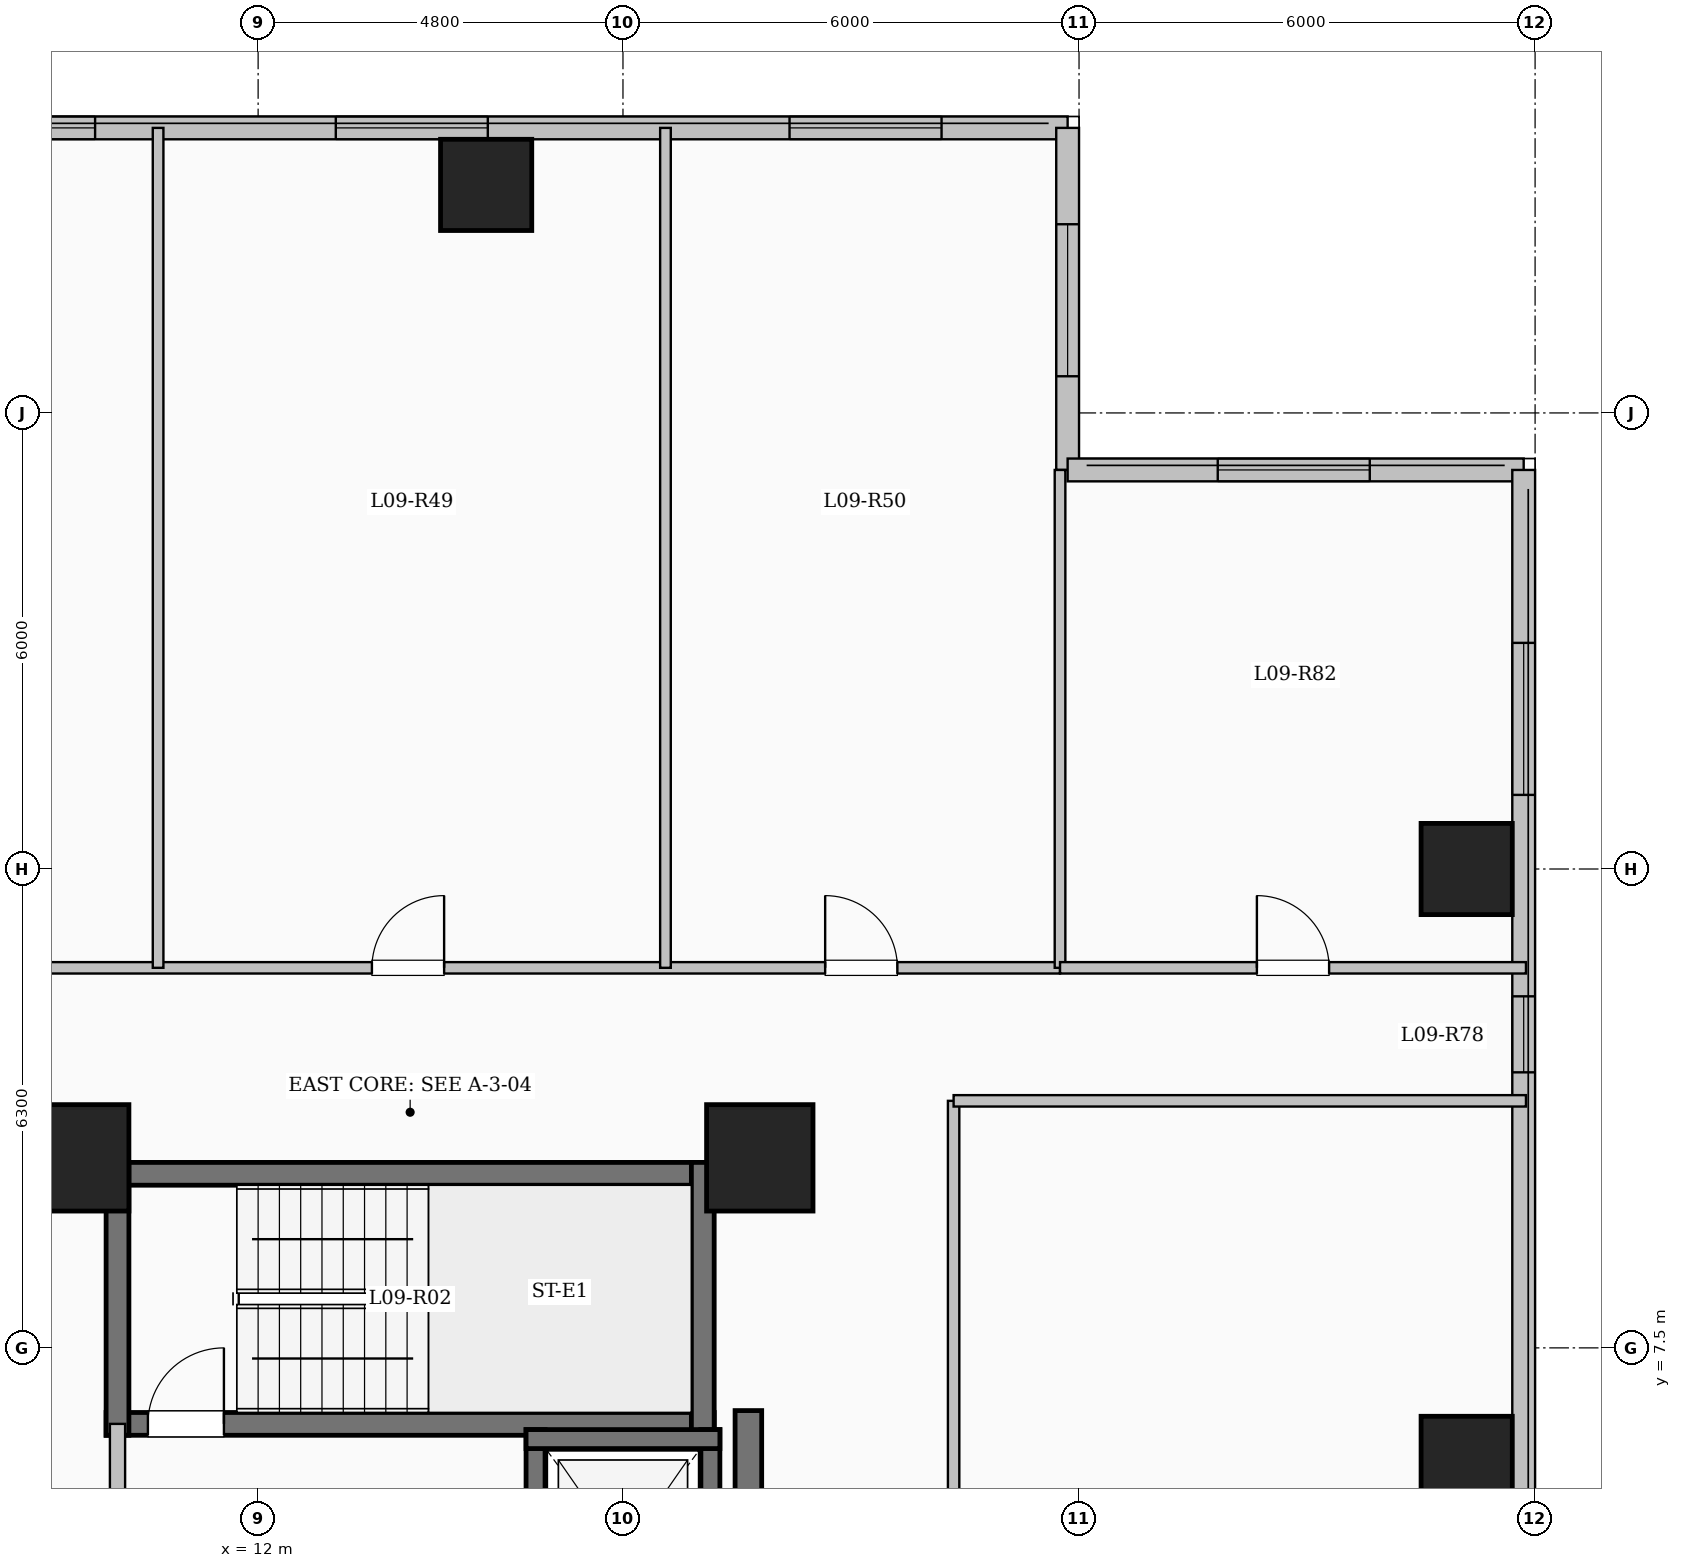
"""IFC4 building model, lengths in metres.
Left out: names, types, materials, properties, quantities, classifications, styles, units other than length and angle.
Written with IfcOpenShell. Run it as: python <this file> out.ifc"""

import sys

from ifc_helpers import new_model, si_unit, direction, frame, frame_2d, origin, origin_2d, place, context, subcontext, project, spatial, rectangle, extrude, element, fill, save


model = new_model("IFC4")
c1 = context("Model", 3, precision=1e-05, world=origin(), true_north=direction((0.0, 1.0)))
c2 = subcontext(c1, "Body", "Model", "MODEL_VIEW")
j1 = project(units=[si_unit("LENGTHUNIT", "METRE"), si_unit("PLANEANGLEUNIT", "RADIAN")], contexts=[c1])
p1 = place(None, origin())
s1 = spatial("IfcSite", under=j1, at=p1, CompositionType="ELEMENT")
p2 = place(p1, origin())
s2 = spatial("IfcBuilding", under=s1, at=p2, CompositionType="ELEMENT")
p3 = place(p2, frame((0.0, 0.0, 37.4)))
s3 = spatial("IfcBuildingStorey", under=s2, at=p3, CompositionType="ELEMENT", Elevation=37.4)
for number, where, z_axis, x_axis in (
    (1, (9.6, 10.0, 0.0), (0.0, 0.0, 1.0), (1.0, 0.0, 0.0)),
    (2, (18.6, 10.0, 0.0), (0.0, 0.0, 1.0), (1.0, 0.0, 0.0)),
):
    element("IfcColumn", number, at=place(p3, frame(where, z_axis=z_axis, x_axis=x_axis)), inside=s3, PredefinedType="COLUMN", context=c2, shape_type="SweptSolid", body=[
        extrude(rectangle(XDim=1.4, YDim=1.4, at=origin_2d()), origin(), (0.0, 0.0, 1.0), 3.35),
    ])
for number, where, z_axis, x_axis in (
    (3, (15.0, 22.8, 0.0), (0.0, 0.0, 1.0), (1.0, 0.0, 0.0)),
    (4, (27.9, 6.0, 0.0), (0.0, 0.0, 1.0), (1.0, 0.0, 0.0)),
    (5, (27.9, 13.8, 0.0), (0.0, 0.0, 1.0), (1.0, 0.0, 0.0)),
):
    element("IfcColumn", number, at=place(p3, frame(where, z_axis=z_axis, x_axis=x_axis)), inside=s3, PredefinedType="COLUMN", context=c2, shape_type="SweptSolid", body=[
        extrude(rectangle(XDim=1.2, YDim=1.2, at=origin_2d()), origin(), (0.0, 0.0, 1.0), 3.35),
    ])
p4 = place(p3, frame((7.35, 23.55, 0.0), z_axis=(0.0, 0.0, 1.0), x_axis=(1.0, 0.0, 0.0)))
e6 = element("IfcWall", 6, at=p4, inside=s3, PredefinedType="SOLIDWALL", context=c2, shape_type="SweptSolid", body=[
    extrude(rectangle(XDim=15.3, YDim=0.3, at=frame_2d((7.65, 0.0))), origin(), (0.0, 0.0, 1.0), 3.1),
])
p5 = place(p4, frame((0.705, 0.0, 0.9)))
e7 = element("IfcOpeningElement", 7, at=p5, cuts=e6, PredefinedType="OPENING", context=c2, shape_type="SweptSolid", body=[
    extrude(rectangle(XDim=1.8, YDim=1.65, at=frame_2d((0.9, 0.825))), frame((0.0, 0.16, 0.0), z_axis=(0.0, -1.0, 0.0), x_axis=(1.0, 0.0, 0.0)), (0.0, 0.0, 1.0), 0.32),
])
p6 = place(p4, frame((5.672, 0.0, 0.9)))
e8 = element("IfcOpeningElement", 8, at=p6, cuts=e6, PredefinedType="OPENING", context=c2, shape_type="SweptSolid", body=[
    extrude(rectangle(XDim=2.0, YDim=1.7, at=frame_2d((1.0, 0.85))), frame((0.0, 0.16, 0.0), z_axis=(0.0, -1.0, 0.0), x_axis=(1.0, 0.0, 0.0)), (0.0, 0.0, 1.0), 0.32),
])
p7 = place(p4, frame((11.641, 0.0, 0.9)))
e9 = element("IfcOpeningElement", 9, at=p7, cuts=e6, PredefinedType="OPENING", context=c2, shape_type="SweptSolid", body=[
    extrude(rectangle(XDim=2.0, YDim=1.7, at=frame_2d((1.0, 0.85))), frame((0.0, 0.16, 0.0), z_axis=(0.0, -1.0, 0.0), x_axis=(1.0, 0.0, 0.0)), (0.0, 0.0, 1.0), 0.32),
])
p8 = place(p3, frame((22.65, 23.55, 0.0), z_axis=(0.0, 0.0, 1.0), x_axis=(0.0, -1.0, 0.0)))
e10 = element("IfcWall", 10, at=p8, inside=s3, PredefinedType="SOLIDWALL", context=c2, shape_type="SweptSolid", body=[
    extrude(rectangle(XDim=4.5, YDim=0.3, at=frame_2d((2.25, 0.0))), origin(), (0.0, 0.0, 1.0), 3.1),
])
p9 = place(p8, frame((1.268, 0.0, 0.9)))
e11 = element("IfcOpeningElement", 11, at=p9, cuts=e10, PredefinedType="OPENING", context=c2, shape_type="SweptSolid", body=[
    extrude(rectangle(XDim=2.0, YDim=1.7, at=frame_2d((1.0, 0.85))), frame((0.0, 0.16, 0.0), z_axis=(0.0, -1.0, 0.0), x_axis=(1.0, 0.0, 0.0)), (0.0, 0.0, 1.0), 0.32),
])
p10 = place(p3, frame((22.65, 19.05, 0.0), z_axis=(0.0, 0.0, 1.0), x_axis=(1.0, 0.0, 0.0)))
e12 = element("IfcWall", 12, at=p10, inside=s3, PredefinedType="SOLIDWALL", context=c2, shape_type="SweptSolid", body=[
    extrude(rectangle(XDim=6.0, YDim=0.3, at=frame_2d((3.0, 0.0))), origin(), (0.0, 0.0, 1.0), 3.1),
])
p11 = place(p10, frame((1.975, 0.0, 0.9)))
e13 = element("IfcOpeningElement", 13, at=p11, cuts=e12, PredefinedType="OPENING", context=c2, shape_type="SweptSolid", body=[
    extrude(rectangle(XDim=2.0, YDim=1.7, at=frame_2d((1.0, 0.85))), frame((0.0, 0.16, 0.0), z_axis=(0.0, -1.0, 0.0), x_axis=(1.0, 0.0, 0.0)), (0.0, 0.0, 1.0), 0.32),
])
p12 = place(p3, frame((28.65, 19.05, 0.0), z_axis=(0.0, 0.0, 1.0), x_axis=(0.0, -1.0, 0.0)))
e14 = element("IfcWall", 14, at=p12, inside=s3, PredefinedType="SOLIDWALL", context=c2, shape_type="SweptSolid", body=[
    extrude(rectangle(XDim=38.1, YDim=0.3, at=frame_2d((19.05, 0.0))), origin(), (0.0, 0.0, 1.0), 3.1),
])
p13 = place(p12, frame((2.275, 0.0, 0.9)))
e15 = element("IfcOpeningElement", 15, at=p13, cuts=e14, PredefinedType="OPENING", context=c2, shape_type="SweptSolid", body=[
    extrude(rectangle(XDim=2.0, YDim=1.7, at=frame_2d((1.0, 0.85))), frame((0.0, 0.16, 0.0), z_axis=(0.0, -1.0, 0.0), x_axis=(1.0, 0.0, 0.0)), (0.0, 0.0, 1.0), 0.32),
])
p14 = place(p12, frame((6.925, 0.0, 0.95)))
e16 = element("IfcOpeningElement", 16, at=p14, cuts=e14, PredefinedType="OPENING", context=c2, shape_type="SweptSolid", body=[
    extrude(rectangle(XDim=1.0, YDim=1.5, at=frame_2d((0.5, 0.75))), frame((0.0, 0.16, 0.0), z_axis=(0.0, -1.0, 0.0), x_axis=(1.0, 0.0, 0.0)), (0.0, 0.0, 1.0), 0.32),
])
p15 = place(p12, frame((16.3, 0.0, 0.9)))
e17 = element("IfcOpeningElement", 17, at=p15, cuts=e14, PredefinedType="OPENING", context=c2, shape_type="SweptSolid", body=[
    extrude(rectangle(XDim=2.0, YDim=1.7, at=frame_2d((1.0, 0.85))), frame((0.0, 0.16, 0.0), z_axis=(0.0, -1.0, 0.0), x_axis=(1.0, 0.0, 0.0)), (0.0, 0.0, 1.0), 0.32),
])
p16 = place(p12, frame((27.058, 0.0, 0.9)))
e18 = element("IfcOpeningElement", 18, at=p16, cuts=e14, PredefinedType="OPENING", context=c2, shape_type="SweptSolid", body=[
    extrude(rectangle(XDim=1.5, YDim=1.65, at=frame_2d((0.75, 0.825))), frame((0.0, 0.16, 0.0), z_axis=(0.0, -1.0, 0.0), x_axis=(1.0, 0.0, 0.0)), (0.0, 0.0, 1.0), 0.32),
])
p17 = place(p12, frame((32.55, 0.0, 0.9)))
e19 = element("IfcOpeningElement", 19, at=p17, cuts=e14, PredefinedType="OPENING", context=c2, shape_type="SweptSolid", body=[
    extrude(rectangle(XDim=2.4, YDim=1.8, at=frame_2d((1.2, 0.9))), frame((0.0, 0.16, 0.0), z_axis=(0.0, -1.0, 0.0), x_axis=(1.0, 0.0, 0.0)), (0.0, 0.0, 1.0), 0.32),
])
p18 = place(p3, frame((10.0, 9.79, 0.0), z_axis=(0.0, 0.0, 1.0), x_axis=(1.0, 0.0, 0.0)))
e20 = element("IfcWall", 20, at=p18, inside=s3, PredefinedType="SHEAR", context=c2, shape_type="SweptSolid", body=[
    extrude(rectangle(XDim=8.0, YDim=0.3, at=frame_2d((4.0, 0.0))), origin(), (0.0, 0.0, 1.0), 3.35),
])
p19 = place(p3, frame((10.0, 6.5, 0.0), z_axis=(0.0, 0.0, 1.0), x_axis=(1.0, 0.0, 0.0)))
e21 = element("IfcWall", 21, at=p19, inside=s3, PredefinedType="SHEAR", context=c2, shape_type="SweptSolid", body=[
    extrude(rectangle(XDim=8.0, YDim=0.3, at=frame_2d((4.0, 0.0))), origin(), (0.0, 0.0, 1.0), 3.35),
])
p20 = place(p19, frame((0.55, 0.0, 0.0)))
e22 = element("IfcOpeningElement", 22, at=p20, cuts=e21, PredefinedType="OPENING", context=c2, shape_type="SweptSolid", body=[
    extrude(rectangle(XDim=1.0, YDim=2.15, at=frame_2d((0.5, 1.075))), frame((0.0, 0.16, 0.0), z_axis=(0.0, -1.0, 0.0), x_axis=(1.0, 0.0, 0.0)), (0.0, 0.0, 1.0), 0.32),
])
for number, where, z_axis, x_axis in (
    (23, (10.15, 6.35, 0.0), (0.0, 0.0, 1.0), (0.0, 1.0, 0.0)),
    (24, (17.85, 6.35, 0.0), (0.0, 0.0, 1.0), (0.0, 1.0, 0.0)),
):
    element("IfcWall", number, at=place(p3, frame(where, z_axis=z_axis, x_axis=x_axis)), inside=s3, PredefinedType="SHEAR", context=c2, shape_type="SweptSolid", body=[
        extrude(rectangle(XDim=3.59, YDim=0.3, at=frame_2d((1.795, 0.0))), origin(), (0.0, 0.0, 1.0), 3.35),
    ])
p21 = place(p3, frame((10.15, 3.25, 0.0), z_axis=(0.0, 0.0, 1.0), x_axis=(0.0, 1.0, 0.0)))
e25 = element("IfcWall", 25, at=p21, inside=s3, PredefinedType="SOLIDWALL", context=c2, shape_type="SweptSolid", body=[
    extrude(rectangle(XDim=3.25, YDim=0.2, at=frame_2d((1.625, 0.0))), origin(), (0.0, 0.0, 1.0), 3.1),
])
p22 = place(p21, frame((1.1, 0.0, 0.0)))
e26 = element("IfcOpeningElement", 26, at=p22, cuts=e25, PredefinedType="OPENING", context=c2, shape_type="SweptSolid", body=[
    extrude(rectangle(XDim=1.02, YDim=2.15, at=frame_2d((0.51, 1.075))), frame((0.0, 0.11, 0.0), z_axis=(0.0, -1.0, 0.0), x_axis=(1.0, 0.0, 0.0)), (0.0, 0.0, 1.0), 0.22),
])
p23 = place(p3, frame((15.65, 3.175, 0.0), z_axis=(0.0, 0.0, 1.0), x_axis=(0.0, 1.0, 0.0)))
e27 = element("IfcWall", 27, at=p23, inside=s3, PredefinedType="SHEAR", context=c2, shape_type="SweptSolid", body=[
    extrude(rectangle(XDim=3.25, YDim=0.25, at=frame_2d((1.625, 0.0))), origin(), (0.0, 0.0, 1.0), 3.35),
])
p24 = place(p23, frame((1.075, 0.0, 0.0)))
e28 = element("IfcOpeningElement", 28, at=p24, cuts=e27, PredefinedType="OPENING", context=c2, shape_type="SweptSolid", body=[
    extrude(rectangle(XDim=1.1, YDim=2.15, at=frame_2d((0.55, 1.075))), frame((0.0, 0.135, 0.0), z_axis=(0.0, -1.0, 0.0), x_axis=(1.0, 0.0, 0.0)), (0.0, 0.0, 1.0), 0.27),
])
p25 = place(p3, frame((17.95, 3.175, 0.0), z_axis=(0.0, 0.0, 1.0), x_axis=(0.0, 1.0, 0.0)))
e29 = element("IfcWall", 29, at=p25, inside=s3, PredefinedType="SHEAR", context=c2, shape_type="SweptSolid", body=[
    extrude(rectangle(XDim=3.25, YDim=0.25, at=frame_2d((1.625, 0.0))), origin(), (0.0, 0.0, 1.0), 3.35),
])
p26 = place(p3, frame((15.525, 6.3, 0.0), z_axis=(0.0, 0.0, 1.0), x_axis=(1.0, 0.0, 0.0)))
e30 = element("IfcWall", 30, at=p26, inside=s3, PredefinedType="SHEAR", context=c2, shape_type="SweptSolid", body=[
    extrude(rectangle(XDim=2.55, YDim=0.25, at=frame_2d((1.275, 0.0))), origin(), (0.0, 0.0, 1.0), 3.35),
])
p27 = place(p3, frame((18.45, -7.375, 0.0), z_axis=(0.0, 0.0, 1.0), x_axis=(0.0, 1.0, 0.0)))
e31 = element("IfcWall", 31, at=p27, inside=s3, PredefinedType="SHEAR", context=c2, shape_type="SweptSolid", body=[
    extrude(rectangle(XDim=14.05, YDim=0.35, at=frame_2d((7.025, 0.0))), origin(), (0.0, 0.0, 1.0), 3.35),
])
p28 = place(p3, frame((3.85, 12.5, 0.0), z_axis=(0.0, 0.0, 1.0), x_axis=(1.0, 0.0, 0.0)))
e32 = element("IfcWall", 32, at=p28, inside=s3, PredefinedType="PARTITIONING", context=c2, shape_type="SweptSolid", body=[
    extrude(rectangle(XDim=18.7, YDim=0.15, at=frame_2d((9.35, 0.0))), origin(), (0.0, 0.0, 1.0), 3.1),
])
p29 = place(p28, frame((2.942, 0.0, 0.0)))
e33 = element("IfcOpeningElement", 33, at=p29, cuts=e32, PredefinedType="OPENING", context=c2, shape_type="SweptSolid", body=[
    extrude(rectangle(XDim=0.95, YDim=2.15, at=frame_2d((0.475, 1.075))), frame((0.0, 0.085, 0.0), z_axis=(0.0, -1.0, 0.0), x_axis=(1.0, 0.0, 0.0)), (0.0, 0.0, 1.0), 0.17),
])
p30 = place(p28, frame((9.647, 0.0, 0.0)))
e34 = element("IfcOpeningElement", 34, at=p30, cuts=e32, PredefinedType="OPENING", context=c2, shape_type="SweptSolid", body=[
    extrude(rectangle(XDim=0.95, YDim=2.15, at=frame_2d((0.475, 1.075))), frame((0.0, 0.085, 0.0), z_axis=(0.0, -1.0, 0.0), x_axis=(1.0, 0.0, 0.0)), (0.0, 0.0, 1.0), 0.17),
])
p31 = place(p28, frame((15.61, 0.0, 0.0)))
e35 = element("IfcOpeningElement", 35, at=p31, cuts=e32, PredefinedType="OPENING", context=c2, shape_type="SweptSolid", body=[
    extrude(rectangle(XDim=0.95, YDim=2.15, at=frame_2d((0.475, 1.075))), frame((0.0, 0.085, 0.0), z_axis=(0.0, -1.0, 0.0), x_axis=(1.0, 0.0, 0.0)), (0.0, 0.0, 1.0), 0.17),
])
p32 = place(p3, frame((21.15, -7.25, 0.0), z_axis=(0.0, 0.0, 1.0), x_axis=(0.0, 1.0, 0.0)))
e36 = element("IfcWall", 36, at=p32, inside=s3, PredefinedType="PARTITIONING", context=c2, shape_type="SweptSolid", body=[
    extrude(rectangle(XDim=18.0, YDim=0.15, at=frame_2d((9.0, 0.0))), origin(), (0.0, 0.0, 1.0), 2.585),
])
for number, where, z_axis, x_axis in (
    (37, (10.684, 12.5, 0.0), (0.0, 0.0, 1.0), (0.0, 1.0, 0.0)),
    (38, (17.359, 12.5, 0.0), (0.0, 0.0, 1.0), (0.0, 1.0, 0.0)),
):
    element("IfcWall", number, at=place(p3, frame(where, z_axis=z_axis, x_axis=x_axis)), inside=s3, PredefinedType="PARTITIONING", context=c2, shape_type="SweptSolid", body=[
        extrude(rectangle(XDim=11.05, YDim=0.14, at=frame_2d((5.525, 0.0))), origin(), (0.0, 0.0, 1.0), 3.1),
    ])
p33 = place(p3, frame((21.15, 10.75, 0.0), z_axis=(0.0, 0.0, 1.0), x_axis=(1.0, 0.0, 0.0)))
e39 = element("IfcWall", 39, at=p33, inside=s3, PredefinedType="PARTITIONING", context=c2, shape_type="SweptSolid", body=[
    extrude(rectangle(XDim=7.53, YDim=0.15, at=frame_2d((3.765, 0.0))), origin(), (0.0, 0.0, 1.0), 3.1),
])
p34 = place(p3, frame((22.55, 12.5, 0.0), z_axis=(0.0, 0.0, 1.0), x_axis=(0.0, 1.0, 0.0)))
e40 = element("IfcWall", 40, at=p34, inside=s3, PredefinedType="PARTITIONING", context=c2, shape_type="SweptSolid", body=[
    extrude(rectangle(XDim=6.55, YDim=0.14, at=frame_2d((3.275, 0.0))), origin(), (0.0, 0.0, 1.0), 3.1),
])
p35 = place(p3, frame((22.55, 12.5, 0.0), z_axis=(0.0, 0.0, 1.0), x_axis=(1.0, 0.0, 0.0)))
e41 = element("IfcWall", 41, at=p35, inside=s3, PredefinedType="PARTITIONING", context=c2, shape_type="SweptSolid", body=[
    extrude(rectangle(XDim=6.13, YDim=0.15, at=frame_2d((3.065, 0.0))), origin(), (0.0, 0.0, 1.0), 3.1),
])
p36 = place(p35, frame((2.59, 0.0, 0.0)))
e42 = element("IfcOpeningElement", 42, at=p36, cuts=e41, PredefinedType="OPENING", context=c2, shape_type="SweptSolid", body=[
    extrude(rectangle(XDim=0.95, YDim=2.15, at=frame_2d((0.475, 1.075))), frame((0.0, 0.085, 0.0), z_axis=(0.0, -1.0, 0.0), x_axis=(1.0, 0.0, 0.0)), (0.0, 0.0, 1.0), 0.17),
])
p37 = place(p5, origin())
e43 = element("IfcWindow", 43, at=p37, inside=s3, PartitioningType="SINGLE_PANEL", PredefinedType="WINDOW", context=c2, shape_type="SweptSolid", body=[
    extrude(rectangle(XDim=1.8, YDim=1.65, at=frame_2d((0.9, 0.825))), frame((0.0, 0.03, 0.0), z_axis=(0.0, -1.0, 0.0), x_axis=(1.0, 0.0, 0.0)), (0.0, 0.0, 1.0), 0.06),
])
fill(e7, e43)
p38 = place(p6, origin())
e44 = element("IfcWindow", 44, at=p38, inside=s3, PartitioningType="SINGLE_PANEL", PredefinedType="WINDOW", context=c2, shape_type="SweptSolid", body=[
    extrude(rectangle(XDim=2.0, YDim=1.7, at=frame_2d((1.0, 0.85))), frame((0.0, 0.03, 0.0), z_axis=(0.0, -1.0, 0.0), x_axis=(1.0, 0.0, 0.0)), (0.0, 0.0, 1.0), 0.06),
])
fill(e8, e44)
p39 = place(p7, origin())
e45 = element("IfcWindow", 45, at=p39, inside=s3, PartitioningType="SINGLE_PANEL", PredefinedType="WINDOW", context=c2, shape_type="SweptSolid", body=[
    extrude(rectangle(XDim=2.0, YDim=1.7, at=frame_2d((1.0, 0.85))), frame((0.0, 0.03, 0.0), z_axis=(0.0, -1.0, 0.0), x_axis=(1.0, 0.0, 0.0)), (0.0, 0.0, 1.0), 0.06),
])
fill(e9, e45)
p40 = place(p9, origin())
e46 = element("IfcWindow", 46, at=p40, inside=s3, PartitioningType="SINGLE_PANEL", PredefinedType="WINDOW", context=c2, shape_type="SweptSolid", body=[
    extrude(rectangle(XDim=2.0, YDim=1.7, at=frame_2d((1.0, 0.85))), frame((0.0, 0.03, 0.0), z_axis=(0.0, -1.0, 0.0), x_axis=(1.0, 0.0, 0.0)), (0.0, 0.0, 1.0), 0.06),
])
fill(e11, e46)
p41 = place(p11, origin())
e47 = element("IfcWindow", 47, at=p41, inside=s3, PartitioningType="SINGLE_PANEL", PredefinedType="WINDOW", context=c2, shape_type="SweptSolid", body=[
    extrude(rectangle(XDim=2.0, YDim=1.7, at=frame_2d((1.0, 0.85))), frame((0.0, 0.03, 0.0), z_axis=(0.0, -1.0, 0.0), x_axis=(1.0, 0.0, 0.0)), (0.0, 0.0, 1.0), 0.06),
])
fill(e13, e47)
p42 = place(p13, origin())
e48 = element("IfcWindow", 48, at=p42, inside=s3, PartitioningType="SINGLE_PANEL", PredefinedType="WINDOW", context=c2, shape_type="SweptSolid", body=[
    extrude(rectangle(XDim=2.0, YDim=1.7, at=frame_2d((1.0, 0.85))), frame((0.0, 0.03, 0.0), z_axis=(0.0, -1.0, 0.0), x_axis=(1.0, 0.0, 0.0)), (0.0, 0.0, 1.0), 0.06),
])
fill(e15, e48)
p43 = place(p14, origin())
e49 = element("IfcWindow", 49, at=p43, inside=s3, PartitioningType="SINGLE_PANEL", PredefinedType="WINDOW", context=c2, shape_type="SweptSolid", body=[
    extrude(rectangle(XDim=1.0, YDim=1.5, at=frame_2d((0.5, 0.75))), frame((0.0, 0.03, 0.0), z_axis=(0.0, -1.0, 0.0), x_axis=(1.0, 0.0, 0.0)), (0.0, 0.0, 1.0), 0.06),
])
fill(e16, e49)
p44 = place(p20, origin())
e50 = element("IfcDoor", 50, at=p44, inside=s3, OperationType="SINGLE_SWING_RIGHT", PredefinedType="DOOR", context=c2, shape_type="SweptSolid", body=[
    extrude(rectangle(XDim=1.0, YDim=2.15, at=frame_2d((0.5, 1.075))), frame((0.0, 0.025, 0.0), z_axis=(0.0, -1.0, 0.0), x_axis=(1.0, 0.0, 0.0)), (0.0, 0.0, 1.0), 0.05),
])
fill(e22, e50)
p45 = place(p30, origin())
e51 = element("IfcDoor", 51, at=p45, inside=s3, OperationType="SINGLE_SWING_RIGHT", PredefinedType="DOOR", context=c2, shape_type="SweptSolid", body=[
    extrude(rectangle(XDim=0.95, YDim=2.15, at=frame_2d((0.475, 1.075))), frame((0.0, 0.025, 0.0), z_axis=(0.0, -1.0, 0.0), x_axis=(1.0, 0.0, 0.0)), (0.0, 0.0, 1.0), 0.05),
])
fill(e34, e51)
p46 = place(p31, origin())
e52 = element("IfcDoor", 52, at=p46, inside=s3, OperationType="SINGLE_SWING_LEFT", PredefinedType="DOOR", context=c2, shape_type="SweptSolid", body=[
    extrude(rectangle(XDim=0.95, YDim=2.15, at=frame_2d((0.475, 1.075))), frame((0.0, 0.025, 0.0), z_axis=(0.0, -1.0, 0.0), x_axis=(1.0, 0.0, 0.0)), (0.0, 0.0, 1.0), 0.05),
])
fill(e35, e52)
p47 = place(p36, origin())
e53 = element("IfcDoor", 53, at=p47, inside=s3, OperationType="SINGLE_SWING_LEFT", PredefinedType="DOOR", context=c2, shape_type="SweptSolid", body=[
    extrude(rectangle(XDim=0.95, YDim=2.15, at=frame_2d((0.475, 1.075))), frame((0.0, 0.025, 0.0), z_axis=(0.0, -1.0, 0.0), x_axis=(1.0, 0.0, 0.0)), (0.0, 0.0, 1.0), 0.05),
])
fill(e42, e53)
save(model, sys.argv[1])
